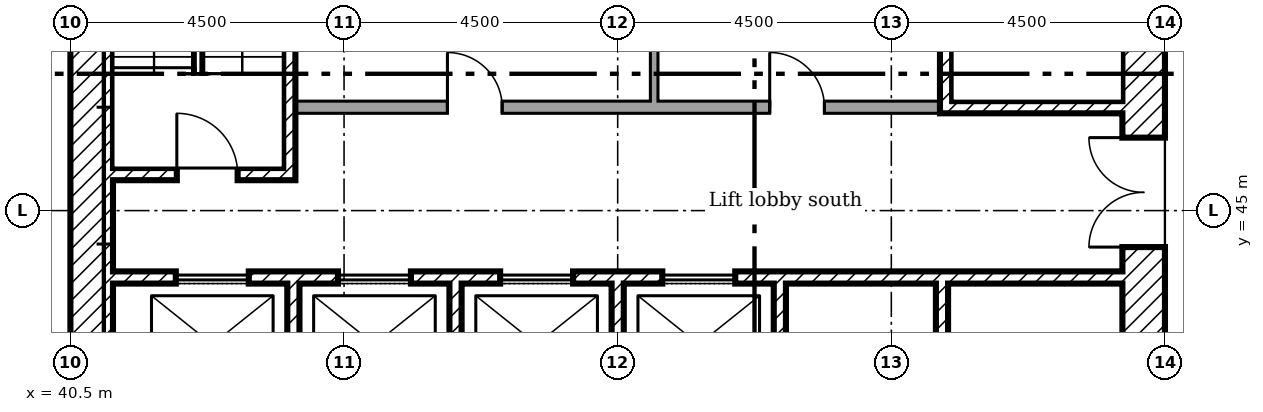
"""IFC4 building model, lengths in metres.
Left out: names, types, materials, properties, quantities, classifications, styles, units other than length and angle.
Written with IfcOpenShell. Run it as: python <this file> out.ifc"""

import sys

from ifc_helpers import new_model, si_unit, direction, frame, frame_2d, origin, place, context, subcontext, project, spatial, rectangle, extrude, element, fill, save


model = new_model("IFC4")
c1 = context("Model", 3, precision=1e-05, world=origin(), true_north=direction((0.0, 1.0)))
c2 = subcontext(c1, "Body", "Model", "MODEL_VIEW")
j1 = project(units=[si_unit("LENGTHUNIT", "METRE"), si_unit("PLANEANGLEUNIT", "RADIAN")], contexts=[c1])
p1 = place(None, origin())
s1 = spatial("IfcSite", under=j1, at=p1, CompositionType="ELEMENT")
p2 = place(p1, origin())
s2 = spatial("IfcBuilding", under=s1, at=p2, CompositionType="ELEMENT")
p3 = place(p2, frame((0.0, 0.0, 113.6)))
s3 = spatial("IfcBuildingStorey", under=s2, at=p3, CompositionType="ELEMENT", Elevation=113.6)
p4 = place(p3, frame((58.15, 40.5, 0.0), z_axis=(0.0, 0.0, 1.0), x_axis=(0.0, 1.0, 0.0)))
e1 = element("IfcWall", 1, at=p4, inside=s3, PredefinedType="SHEAR", context=c2, shape_type="SweptSolid", body=[
    extrude(rectangle(XDim=18.0, YDim=0.7, at=frame_2d((9.0, 0.0))), origin(), (0.0, 0.0, 1.0), 6.95),
])
p5 = place(p4, frame((13.15, 0.0, 0.0)))
e2 = element("IfcOpeningElement", 2, at=p5, cuts=e1, PredefinedType="OPENING", context=c2, shape_type="SweptSolid", body=[
    extrude(rectangle(XDim=1.2, YDim=2.1, at=frame_2d((0.6, 1.05))), frame((0.0, 0.36, 0.0), z_axis=(0.0, -1.0, 0.0), x_axis=(1.0, 0.0, 0.0)), (0.0, 0.0, 1.0), 0.72),
])
p6 = place(p4, frame((3.9, 0.0, 0.0)))
e3 = element("IfcOpeningElement", 3, at=p6, cuts=e1, PredefinedType="OPENING", context=c2, shape_type="SweptSolid", body=[
    extrude(rectangle(XDim=1.8, YDim=2.1, at=frame_2d((0.9, 1.05))), frame((0.0, 0.36, 0.0), z_axis=(0.0, -1.0, 0.0), x_axis=(1.0, 0.0, 0.0)), (0.0, 0.0, 1.0), 0.72),
])
p7 = place(p4, frame((11.525, 0.0, 0.0)))
e4 = element("IfcOpeningElement", 4, at=p7, cuts=e1, PredefinedType="OPENING", context=c2, shape_type="SweptSolid", body=[
    extrude(rectangle(XDim=1.0, YDim=2.1, at=frame_2d((0.5, 1.05))), frame((0.0, 0.36, 0.0), z_axis=(0.0, -1.0, 0.0), x_axis=(1.0, 0.0, 0.0)), (0.0, 0.0, 1.0), 0.72),
])
p8 = place(p3, frame((40.85, 40.5, 0.0), z_axis=(0.0, 0.0, 1.0), x_axis=(0.0, 1.0, 0.0)))
e5 = element("IfcWall", 5, at=p8, inside=s3, PredefinedType="SHEAR", context=c2, shape_type="SweptSolid", body=[
    extrude(rectangle(XDim=18.0, YDim=0.7, at=frame_2d((9.0, 0.0))), origin(), (0.0, 0.0, 1.0), 6.95),
])
for number, where, z_axis, x_axis in (
    (6, (44.167, 41.2, 0.0), (0.0, 0.0, 1.0), (0.0, 1.0, 0.0)),
    (7, (46.833, 41.2, 0.0), (0.0, 0.0, 1.0), (0.0, 1.0, 0.0)),
    (8, (49.5, 41.2, 0.0), (0.0, 0.0, 1.0), (0.0, 1.0, 0.0)),
    (9, (52.167, 41.2, 0.0), (0.0, 0.0, 1.0), (0.0, 1.0, 0.0)),
    (10, (54.833, 41.2, 0.0), (0.0, 0.0, 1.0), (0.0, 1.0, 0.0)),
):
    element("IfcWall", number, at=place(p3, frame(where, z_axis=z_axis, x_axis=x_axis)), inside=s3, PredefinedType="SHEAR", context=c2, shape_type="SweptSolid", body=[
        extrude(rectangle(XDim=2.6, YDim=0.2, at=frame_2d((1.3, 0.0))), origin(), (0.0, 0.0, 1.0), 6.95),
    ])
p9 = place(p3, frame((41.2, 43.9, 0.0)))
e11 = element("IfcWall", 11, at=p9, inside=s3, PredefinedType="SHEAR", context=c2, shape_type="SweptSolid", body=[
    extrude(rectangle(XDim=16.6, YDim=0.2, at=frame_2d((8.3, 0.0))), origin(), (0.0, 0.0, 1.0), 6.95),
])
p10 = place(p9, frame((1.033, 0.0, 0.0)))
e12 = element("IfcOpeningElement", 12, at=p10, cuts=e11, PredefinedType="OPENING", context=c2, shape_type="SweptSolid", body=[
    extrude(rectangle(XDim=1.2, YDim=2.1, at=frame_2d((0.6, 1.05))), frame((0.0, 0.11, 0.0), z_axis=(0.0, -1.0, 0.0), x_axis=(1.0, 0.0, 0.0)), (0.0, 0.0, 1.0), 0.22),
])
p11 = place(p9, frame((3.7, 0.0, 0.0)))
e13 = element("IfcOpeningElement", 13, at=p11, cuts=e11, PredefinedType="OPENING", context=c2, shape_type="SweptSolid", body=[
    extrude(rectangle(XDim=1.2, YDim=2.1, at=frame_2d((0.6, 1.05))), frame((0.0, 0.11, 0.0), z_axis=(0.0, -1.0, 0.0), x_axis=(1.0, 0.0, 0.0)), (0.0, 0.0, 1.0), 0.22),
])
p12 = place(p9, frame((6.367, 0.0, 0.0)))
e14 = element("IfcOpeningElement", 14, at=p12, cuts=e11, PredefinedType="OPENING", context=c2, shape_type="SweptSolid", body=[
    extrude(rectangle(XDim=1.2, YDim=2.1, at=frame_2d((0.6, 1.05))), frame((0.0, 0.11, 0.0), z_axis=(0.0, -1.0, 0.0), x_axis=(1.0, 0.0, 0.0)), (0.0, 0.0, 1.0), 0.22),
])
p13 = place(p9, frame((9.033, 0.0, 0.0)))
e15 = element("IfcOpeningElement", 15, at=p13, cuts=e11, PredefinedType="OPENING", context=c2, shape_type="SweptSolid", body=[
    extrude(rectangle(XDim=1.2, YDim=2.1, at=frame_2d((0.6, 1.05))), frame((0.0, 0.11, 0.0), z_axis=(0.0, -1.0, 0.0), x_axis=(1.0, 0.0, 0.0)), (0.0, 0.0, 1.0), 0.22),
])
p14 = place(p3, frame((44.1, 45.5, 0.0), z_axis=(0.0, 0.0, 1.0), x_axis=(0.0, 1.0, 0.0)))
e16 = element("IfcWall", 16, at=p14, inside=s3, PredefinedType="SHEAR", context=c2, shape_type="SweptSolid", body=[
    extrude(rectangle(XDim=6.9, YDim=0.2, at=frame_2d((3.45, 0.0))), origin(), (0.0, 0.0, 1.0), 6.95),
])
p15 = place(p3, frame((41.2, 45.6, 0.0)))
e17 = element("IfcWall", 17, at=p15, inside=s3, PredefinedType="SHEAR", context=c2, shape_type="SweptSolid", body=[
    extrude(rectangle(XDim=2.8, YDim=0.2, at=frame_2d((1.4, 0.0))), origin(), (0.0, 0.0, 1.0), 6.95),
])
p16 = place(p15, frame((1.05, 0.0, 0.0)))
e18 = element("IfcOpeningElement", 18, at=p16, cuts=e17, PredefinedType="OPENING", context=c2, shape_type="SweptSolid", body=[
    extrude(rectangle(XDim=1.0, YDim=2.1, at=frame_2d((0.5, 1.05))), frame((0.0, 0.11, 0.0), z_axis=(0.0, -1.0, 0.0), x_axis=(1.0, 0.0, 0.0)), (0.0, 0.0, 1.0), 0.22),
])
p17 = place(p3, frame((54.8, 46.7, 0.0)))
e19 = element("IfcWall", 19, at=p17, inside=s3, PredefinedType="SHEAR", context=c2, shape_type="SweptSolid", body=[
    extrude(rectangle(XDim=3.0, YDim=0.2, at=frame_2d((1.5, 0.0))), origin(), (0.0, 0.0, 1.0), 6.95),
])
p18 = place(p3, frame((54.9, 46.8, 0.0), z_axis=(0.0, 0.0, 1.0), x_axis=(0.0, 1.0, 0.0)))
e20 = element("IfcWall", 20, at=p18, inside=s3, PredefinedType="SHEAR", context=c2, shape_type="SweptSolid", body=[
    extrude(rectangle(XDim=6.5, YDim=0.2, at=frame_2d((3.25, 0.0))), origin(), (0.0, 0.0, 1.0), 6.95),
])
p19 = place(p3, frame((44.2, 46.7, 0.0)))
e21 = element("IfcWall", 21, at=p19, inside=s3, PredefinedType="PARTITIONING", context=c2, shape_type="SweptSolid", body=[
    extrude(rectangle(XDim=10.6, YDim=0.2, at=frame_2d((5.3, 0.0))), origin(), (0.0, 0.0, 1.0), 6.95),
])
p20 = place(p19, frame((2.5, 0.0, 0.0)))
e22 = element("IfcOpeningElement", 22, at=p20, cuts=e21, PredefinedType="OPENING", context=c2, shape_type="SweptSolid", body=[
    extrude(rectangle(XDim=0.9, YDim=2.1, at=frame_2d((0.45, 1.05))), frame((0.0, 0.11, 0.0), z_axis=(0.0, -1.0, 0.0), x_axis=(1.0, 0.0, 0.0)), (0.0, 0.0, 1.0), 0.22),
])
p21 = place(p19, frame((7.8, 0.0, 0.0)))
e23 = element("IfcOpeningElement", 23, at=p21, cuts=e21, PredefinedType="OPENING", context=c2, shape_type="SweptSolid", body=[
    extrude(rectangle(XDim=0.9, YDim=2.1, at=frame_2d((0.45, 1.05))), frame((0.0, 0.11, 0.0), z_axis=(0.0, -1.0, 0.0), x_axis=(1.0, 0.0, 0.0)), (0.0, 0.0, 1.0), 0.22),
])
p22 = place(p3, frame((50.1, 46.8, 0.0), z_axis=(0.0, 0.0, 1.0), x_axis=(0.0, 1.0, 0.0)))
e24 = element("IfcWall", 24, at=p22, inside=s3, PredefinedType="PARTITIONING", context=c2, shape_type="SweptSolid", body=[
    extrude(rectangle(XDim=1.962, YDim=0.125, at=frame_2d((0.981, 0.0))), origin(), (0.0, 0.0, 1.0), 6.95),
])
p23 = place(p6, origin())
e25 = element("IfcDoor", 25, at=p23, inside=s3, OperationType="DOUBLE_DOOR_SINGLE_SWING", PredefinedType="DOOR", context=c2, shape_type="SweptSolid", body=[
    extrude(rectangle(XDim=1.8, YDim=2.1, at=frame_2d((0.9, 1.05))), frame((0.0, 0.025, 0.0), z_axis=(0.0, -1.0, 0.0), x_axis=(1.0, 0.0, 0.0)), (0.0, 0.0, 1.0), 0.05),
])
fill(e3, e25)
p24 = place(p16, origin())
e26 = element("IfcDoor", 26, at=p24, inside=s3, OperationType="SINGLE_SWING_RIGHT", PredefinedType="DOOR", context=c2, shape_type="SweptSolid", body=[
    extrude(rectangle(XDim=1.0, YDim=2.1, at=frame_2d((0.5, 1.05))), frame((0.0, 0.025, 0.0), z_axis=(0.0, -1.0, 0.0), x_axis=(1.0, 0.0, 0.0)), (0.0, 0.0, 1.0), 0.05),
])
fill(e18, e26)
p25 = place(p20, origin())
e27 = element("IfcDoor", 27, at=p25, inside=s3, OperationType="SINGLE_SWING_RIGHT", PredefinedType="DOOR", context=c2, shape_type="SweptSolid", body=[
    extrude(rectangle(XDim=0.9, YDim=2.1, at=frame_2d((0.45, 1.05))), frame((0.0, 0.025, 0.0), z_axis=(0.0, -1.0, 0.0), x_axis=(1.0, 0.0, 0.0)), (0.0, 0.0, 1.0), 0.05),
])
fill(e22, e27)
p26 = place(p21, origin())
e28 = element("IfcDoor", 28, at=p26, inside=s3, OperationType="SINGLE_SWING_RIGHT", PredefinedType="DOOR", context=c2, shape_type="SweptSolid", body=[
    extrude(rectangle(XDim=0.9, YDim=2.1, at=frame_2d((0.45, 1.05))), frame((0.0, 0.025, 0.0), z_axis=(0.0, -1.0, 0.0), x_axis=(1.0, 0.0, 0.0)), (0.0, 0.0, 1.0), 0.05),
])
fill(e23, e28)
p27 = place(p10, origin())
e29 = element("IfcDoor", 29, at=p27, inside=s3, OperationType="SLIDING_TO_LEFT", PredefinedType="DOOR", context=c2, shape_type="SweptSolid", body=[
    extrude(rectangle(XDim=1.2, YDim=2.1, at=frame_2d((0.6, 1.05))), frame((0.0, 0.025, 0.0), z_axis=(0.0, -1.0, 0.0), x_axis=(1.0, 0.0, 0.0)), (0.0, 0.0, 1.0), 0.05),
])
fill(e12, e29)
p28 = place(p11, origin())
e30 = element("IfcDoor", 30, at=p28, inside=s3, OperationType="SLIDING_TO_LEFT", PredefinedType="DOOR", context=c2, shape_type="SweptSolid", body=[
    extrude(rectangle(XDim=1.2, YDim=2.1, at=frame_2d((0.6, 1.05))), frame((0.0, 0.025, 0.0), z_axis=(0.0, -1.0, 0.0), x_axis=(1.0, 0.0, 0.0)), (0.0, 0.0, 1.0), 0.05),
])
fill(e13, e30)
p29 = place(p12, origin())
e31 = element("IfcDoor", 31, at=p29, inside=s3, OperationType="SLIDING_TO_LEFT", PredefinedType="DOOR", context=c2, shape_type="SweptSolid", body=[
    extrude(rectangle(XDim=1.2, YDim=2.1, at=frame_2d((0.6, 1.05))), frame((0.0, 0.025, 0.0), z_axis=(0.0, -1.0, 0.0), x_axis=(1.0, 0.0, 0.0)), (0.0, 0.0, 1.0), 0.05),
])
fill(e14, e31)
p30 = place(p13, origin())
e32 = element("IfcDoor", 32, at=p30, inside=s3, OperationType="SLIDING_TO_LEFT", PredefinedType="DOOR", context=c2, shape_type="SweptSolid", body=[
    extrude(rectangle(XDim=1.2, YDim=2.1, at=frame_2d((0.6, 1.05))), frame((0.0, 0.025, 0.0), z_axis=(0.0, -1.0, 0.0), x_axis=(1.0, 0.0, 0.0)), (0.0, 0.0, 1.0), 0.05),
])
fill(e15, e32)
save(model, sys.argv[1])
